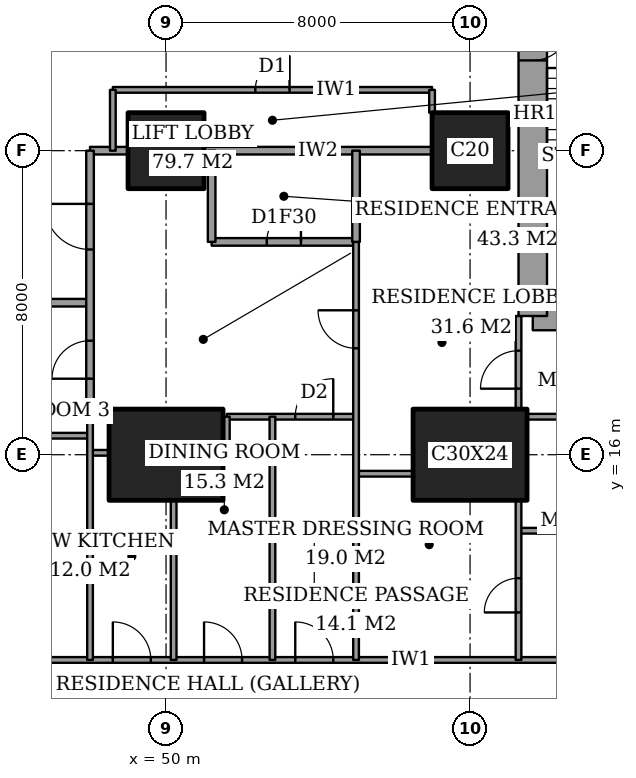
"""IFC4 building model, lengths in metres.
Left out: names, types, materials, properties, quantities, classifications, styles, units other than length and angle.
Written with IfcOpenShell. Run it as: python <this file> out.ifc"""

import sys

from ifc_helpers import new_model, si_unit, direction, frame, frame_2d, origin, origin_2d, place, context, subcontext, project, spatial, rectangle, extrude, element, fill, save


model = new_model("IFC4")
c1 = context("Model", 3, precision=1e-05, world=origin(), true_north=direction((0.0, 1.0)))
c2 = subcontext(c1, "Body", "Model", "MODEL_VIEW")
j1 = project(units=[si_unit("LENGTHUNIT", "METRE"), si_unit("PLANEANGLEUNIT", "RADIAN")], contexts=[c1])
p1 = place(None, origin())
s1 = spatial("IfcSite", under=j1, at=p1, CompositionType="ELEMENT")
p2 = place(p1, origin())
s2 = spatial("IfcBuilding", under=s1, at=p2, CompositionType="ELEMENT")
p3 = place(p2, frame((0.0, 0.0, 65.6)))
s3 = spatial("IfcBuildingStorey", under=s2, at=p3, CompositionType="ELEMENT", Elevation=65.6)
p4 = place(p3, frame((50.0, 16.0, 0.0), z_axis=(0.0, 0.0, 1.0), x_axis=(1.0, 0.0, 0.0)))
e1 = element("IfcColumn", 1, at=p4, inside=s3, PredefinedType="COLUMN", context=c2, shape_type="SweptSolid", body=[
    extrude(rectangle(XDim=3.0, YDim=2.4, at=origin_2d()), origin(), (0.0, 0.0, 1.0), 3.6),
])
p5 = place(p3, frame((50.0, 24.0, 0.0), z_axis=(0.0, 0.0, 1.0), x_axis=(1.0, 0.0, 0.0)))
e2 = element("IfcColumn", 2, at=p5, inside=s3, PredefinedType="COLUMN", context=c2, shape_type="SweptSolid", body=[
    extrude(rectangle(XDim=2.0, YDim=2.0, at=origin_2d()), origin(), (0.0, 0.0, 1.0), 3.6),
])
p6 = place(p3, frame((58.0, 16.0, 0.0), z_axis=(0.0, 0.0, 1.0), x_axis=(1.0, 0.0, 0.0)))
e3 = element("IfcColumn", 3, at=p6, inside=s3, PredefinedType="COLUMN", context=c2, shape_type="SweptSolid", body=[
    extrude(rectangle(XDim=3.0, YDim=2.4, at=origin_2d()), origin(), (0.0, 0.0, 1.0), 3.6),
])
p7 = place(p3, frame((58.0, 24.0, 0.0), z_axis=(0.0, 0.0, 1.0), x_axis=(1.0, 0.0, 0.0)))
e4 = element("IfcColumn", 4, at=p7, inside=s3, PredefinedType="COLUMN", context=c2, shape_type="SweptSolid", body=[
    extrude(rectangle(XDim=2.0, YDim=2.0, at=origin_2d()), origin(), (0.0, 0.0, 1.0), 3.6),
])
p8 = place(p3, frame((59.65, 19.65, 0.0), z_axis=(0.0, 0.0, 1.0), x_axis=(1.0, 0.0, 0.0)))
e5 = element("IfcWall", 5, at=p8, inside=s3, PredefinedType="SHEAR", context=c2, shape_type="SweptSolid", body=[
    extrude(rectangle(XDim=4.45, YDim=0.75, at=frame_2d((2.225, 0.0))), origin(), (0.0, 0.0, 1.0), 3.6),
])
p9 = place(p3, frame((59.65, 28.35, 0.0), z_axis=(0.0, 0.0, 1.0), x_axis=(0.0, -1.0, 0.0)))
e6 = element("IfcWall", 6, at=p9, inside=s3, PredefinedType="SHEAR", context=c2, shape_type="SweptSolid", body=[
    extrude(rectangle(XDim=8.7, YDim=0.75, at=frame_2d((4.35, 0.0))), origin(), (0.0, 0.0, 1.0), 3.6),
])
p10 = place(p9, frame((0.975, 0.0, 0.0)))
e7 = element("IfcOpeningElement", 7, at=p10, cuts=e6, PredefinedType="OPENING", context=c2, shape_type="SweptSolid", body=[
    extrude(rectangle(XDim=1.0, YDim=2.1, at=frame_2d((0.5, 1.05))), frame((0.0, 0.385, 0.0), z_axis=(0.0, -1.0, 0.0), x_axis=(1.0, 0.0, 0.0)), (0.0, 0.0, 1.0), 0.77),
])
p11 = place(p3, frame((41.439, 10.6, 0.0), z_axis=(0.0, 0.0, 1.0), x_axis=(1.0, 0.0, 0.0)))
e8 = element("IfcWall", 8, at=p11, inside=s3, PredefinedType="PARTITIONING", context=c2, shape_type="SweptSolid", body=[
    extrude(rectangle(XDim=25.011, YDim=0.15, at=frame_2d((12.505, 0.0))), origin(), (0.0, 0.0, 1.0), 3.35),
])
p12 = place(p11, frame((11.961, 0.0, 0.0)))
e9 = element("IfcOpeningElement", 9, at=p12, cuts=e8, PredefinedType="OPENING", context=c2, shape_type="SweptSolid", body=[
    extrude(rectangle(XDim=1.0, YDim=2.1, at=frame_2d((0.5, 1.05))), frame((0.0, 0.085, 0.0), z_axis=(0.0, -1.0, 0.0), x_axis=(1.0, 0.0, 0.0)), (0.0, 0.0, 1.0), 0.17),
])
p13 = place(p11, frame((20.924, 0.0, 0.0)))
e10 = element("IfcOpeningElement", 10, at=p13, cuts=e8, PredefinedType="OPENING", context=c2, shape_type="SweptSolid", body=[
    extrude(rectangle(XDim=1.0, YDim=2.1, at=frame_2d((0.5, 1.05))), frame((0.0, 0.085, 0.0), z_axis=(0.0, -1.0, 0.0), x_axis=(1.0, 0.0, 0.0)), (0.0, 0.0, 1.0), 0.17),
])
p14 = place(p11, frame((9.561, 0.0, 0.0)))
e11 = element("IfcOpeningElement", 11, at=p14, cuts=e8, PredefinedType="OPENING", context=c2, shape_type="SweptSolid", body=[
    extrude(rectangle(XDim=1.0, YDim=2.1, at=frame_2d((0.5, 1.05))), frame((0.0, 0.085, 0.0), z_axis=(0.0, -1.0, 0.0), x_axis=(1.0, 0.0, 0.0)), (0.0, 0.0, 1.0), 0.17),
])
p15 = place(p11, frame((7.161, 0.0, 0.0)))
e12 = element("IfcOpeningElement", 12, at=p15, cuts=e8, PredefinedType="OPENING", context=c2, shape_type="SweptSolid", body=[
    extrude(rectangle(XDim=1.0, YDim=2.1, at=frame_2d((0.5, 1.05))), frame((0.0, 0.085, 0.0), z_axis=(0.0, -1.0, 0.0), x_axis=(1.0, 0.0, 0.0)), (0.0, 0.0, 1.0), 0.17),
])
p16 = place(p11, frame((2.836, 0.0, 0.0)))
e13 = element("IfcOpeningElement", 13, at=p16, cuts=e8, PredefinedType="OPENING", context=c2, shape_type="SweptSolid", body=[
    extrude(rectangle(XDim=1.0, YDim=2.1, at=frame_2d((0.5, 1.05))), frame((0.0, 0.085, 0.0), z_axis=(0.0, -1.0, 0.0), x_axis=(1.0, 0.0, 0.0)), (0.0, 0.0, 1.0), 0.17),
])
p17 = place(p3, frame((45.6, 13.9, 0.0), z_axis=(0.0, 0.0, 1.0), x_axis=(1.0, 0.0, 0.0)))
e14 = element("IfcWall", 14, at=p17, inside=s3, PredefinedType="PARTITIONING", context=c2, shape_type="SweptSolid", body=[
    extrude(rectangle(XDim=2.4, YDim=0.15, at=frame_2d((1.2, 0.0))), origin(), (0.0, 0.0, 1.0), 3.35),
])
p18 = place(p3, frame((59.275, 14.0, 0.0), z_axis=(0.0, 0.0, 1.0), x_axis=(1.0, 0.0, 0.0)))
e15 = element("IfcWall", 15, at=p18, inside=s3, PredefinedType="PARTITIONING", context=c2, shape_type="SweptSolid", body=[
    extrude(rectangle(XDim=2.6, YDim=0.15, at=frame_2d((1.3, 0.0))), origin(), (0.0, 0.0, 1.0), 3.35),
])
p19 = place(p3, frame((55.0, 15.5, 0.0), z_axis=(0.0, 0.0, 1.0), x_axis=(1.0, 0.0, 0.0)))
e16 = element("IfcWall", 16, at=p19, inside=s3, PredefinedType="PARTITIONING", context=c2, shape_type="SweptSolid", body=[
    extrude(rectangle(XDim=1.5, YDim=0.15, at=frame_2d((0.75, 0.0))), origin(), (0.0, 0.0, 1.0), 3.35),
])
p20 = place(p3, frame((48.0, 16.05, 0.0), z_axis=(0.0, 0.0, 1.0), x_axis=(1.0, 0.0, 0.0)))
e17 = element("IfcWall", 17, at=p20, inside=s3, PredefinedType="PARTITIONING", context=c2, shape_type="SweptSolid", body=[
    extrude(rectangle(XDim=0.5, YDim=0.15, at=frame_2d((0.25, 0.0))), origin(), (0.0, 0.0, 1.0), 2.634),
])
p21 = place(p3, frame((42.0, 16.5, 0.0), z_axis=(0.0, 0.0, 1.0), x_axis=(1.0, 0.0, 0.0)))
e18 = element("IfcWall", 18, at=p21, inside=s3, PredefinedType="PARTITIONING", context=c2, shape_type="SweptSolid", body=[
    extrude(rectangle(XDim=6.0, YDim=0.15, at=frame_2d((3.0, 0.0))), origin(), (0.0, 0.0, 1.0), 3.35),
])
p22 = place(p3, frame((51.6, 17.0, 0.0), z_axis=(0.0, 0.0, 1.0), x_axis=(1.0, 0.0, 0.0)))
e19 = element("IfcWall", 19, at=p22, inside=s3, PredefinedType="PARTITIONING", context=c2, shape_type="SweptSolid", body=[
    extrude(rectangle(XDim=3.4, YDim=0.15, at=frame_2d((1.7, 0.0))), origin(), (0.0, 0.0, 1.0), 3.35),
])
p23 = place(p22, frame((1.8, 0.0, 0.0)))
e20 = element("IfcOpeningElement", 20, at=p23, cuts=e19, PredefinedType="OPENING", context=c2, shape_type="SweptSolid", body=[
    extrude(rectangle(XDim=1.0, YDim=2.1, at=frame_2d((0.5, 1.05))), frame((0.0, 0.085, 0.0), z_axis=(0.0, -1.0, 0.0), x_axis=(1.0, 0.0, 0.0)), (0.0, 0.0, 1.0), 0.17),
])
p24 = place(p3, frame((59.5, 17.0, 0.0), z_axis=(0.0, 0.0, 1.0), x_axis=(1.0, 0.0, 0.0)))
e21 = element("IfcWall", 21, at=p24, inside=s3, PredefinedType="PARTITIONING", context=c2, shape_type="SweptSolid", body=[
    extrude(rectangle(XDim=5.15, YDim=0.15, at=frame_2d((2.575, 0.0))), origin(), (0.0, 0.0, 1.0), 3.35),
])
p25 = place(p3, frame((42.0, 20.0, 0.0), z_axis=(0.0, 0.0, 1.0), x_axis=(1.0, 0.0, 0.0)))
e22 = element("IfcWall", 22, at=p25, inside=s3, PredefinedType="PARTITIONING", context=c2, shape_type="SweptSolid", body=[
    extrude(rectangle(XDim=6.0, YDim=0.2, at=frame_2d((3.0, 0.0))), origin(), (0.0, 0.0, 1.0), 3.35),
])
p26 = place(p3, frame((51.2, 21.6, 0.0), z_axis=(0.0, 0.0, 1.0), x_axis=(1.0, 0.0, 0.0)))
e23 = element("IfcWall", 23, at=p26, inside=s3, PredefinedType="PARTITIONING", context=c2, shape_type="SweptSolid", body=[
    extrude(rectangle(XDim=3.8, YDim=0.2, at=frame_2d((1.9, 0.0))), origin(), (0.0, 0.0, 1.0), 3.35),
])
p27 = place(p26, frame((1.45, 0.0, 0.0)))
e24 = element("IfcOpeningElement", 24, at=p27, cuts=e23, PredefinedType="OPENING", context=c2, shape_type="SweptSolid", body=[
    extrude(rectangle(XDim=0.9, YDim=2.1, at=frame_2d((0.45, 1.05))), frame((0.0, 0.11, 0.0), z_axis=(0.0, -1.0, 0.0), x_axis=(1.0, 0.0, 0.0)), (0.0, 0.0, 1.0), 0.22),
])
p28 = place(p3, frame((48.0, 24.0, 0.0), z_axis=(0.0, 0.0, 1.0), x_axis=(1.0, 0.0, 0.0)))
e25 = element("IfcWall", 25, at=p28, inside=s3, PredefinedType="PARTITIONING", context=c2, shape_type="SweptSolid", body=[
    extrude(rectangle(XDim=1.0, YDim=0.2, at=frame_2d((0.5, 0.0))), origin(), (0.0, 0.0, 1.0), 3.35),
])
p29 = place(p3, frame((51.0, 24.0, 0.0), z_axis=(0.0, 0.0, 1.0), x_axis=(1.0, 0.0, 0.0)))
e26 = element("IfcWall", 26, at=p29, inside=s3, PredefinedType="PARTITIONING", context=c2, shape_type="SweptSolid", body=[
    extrude(rectangle(XDim=6.0, YDim=0.2, at=frame_2d((3.0, 0.0))), origin(), (0.0, 0.0, 1.0), 3.35),
])
p30 = place(p3, frame((48.6, 25.6, 0.0), z_axis=(0.0, 0.0, 1.0), x_axis=(1.0, 0.0, 0.0)))
e27 = element("IfcWall", 27, at=p30, inside=s3, PredefinedType="PARTITIONING", context=c2, shape_type="SweptSolid", body=[
    extrude(rectangle(XDim=8.4, YDim=0.15, at=frame_2d((4.2, 0.0))), origin(), (0.0, 0.0, 1.0), 3.35),
])
p31 = place(p30, frame((3.75, 0.0, 0.0)))
e28 = element("IfcOpeningElement", 28, at=p31, cuts=e27, PredefinedType="OPENING", context=c2, shape_type="SweptSolid", body=[
    extrude(rectangle(XDim=0.9, YDim=2.1, at=frame_2d((0.45, 1.05))), frame((0.0, 0.085, 0.0), z_axis=(0.0, -1.0, 0.0), x_axis=(1.0, 0.0, 0.0)), (0.0, 0.0, 1.0), 0.17),
])
p32 = place(p3, frame((48.0, 17.0, 0.0), z_axis=(0.0, 0.0, 1.0), x_axis=(0.0, 1.0, 0.0)))
e29 = element("IfcWall", 29, at=p32, inside=s3, PredefinedType="PARTITIONING", context=c2, shape_type="SweptSolid", body=[
    extrude(rectangle(XDim=7.0, YDim=0.2, at=frame_2d((3.5, 0.0))), origin(), (0.0, 0.0, 1.0), 3.35),
])
p33 = place(p32, frame((4.4, 0.0, 0.0)))
e30 = element("IfcOpeningElement", 30, at=p33, cuts=e29, PredefinedType="OPENING", context=c2, shape_type="SweptSolid", body=[
    extrude(rectangle(XDim=1.2, YDim=2.4, at=frame_2d((0.6, 1.2))), frame((0.0, 0.11, 0.0), z_axis=(0.0, -1.0, 0.0), x_axis=(1.0, 0.0, 0.0)), (0.0, 0.0, 1.0), 0.22),
])
p34 = place(p32, frame((1.0, 0.0, 0.0)))
e31 = element("IfcOpeningElement", 31, at=p34, cuts=e29, PredefinedType="OPENING", context=c2, shape_type="SweptSolid", body=[
    extrude(rectangle(XDim=1.0, YDim=2.1, at=frame_2d((0.5, 1.05))), frame((0.0, 0.11, 0.0), z_axis=(0.0, -1.0, 0.0), x_axis=(1.0, 0.0, 0.0)), (0.0, 0.0, 1.0), 0.22),
])
p35 = place(p3, frame((48.0, 10.6, 0.0), z_axis=(0.0, 0.0, 1.0), x_axis=(0.0, 1.0, 0.0)))
e32 = element("IfcWall", 32, at=p35, inside=s3, PredefinedType="PARTITIONING", context=c2, shape_type="SweptSolid", body=[
    extrude(rectangle(XDim=6.4, YDim=0.15, at=frame_2d((3.2, 0.0))), origin(), (0.0, 0.0, 1.0), 3.35),
])
p36 = place(p3, frame((48.6, 24.0, 0.0), z_axis=(0.0, 0.0, 1.0), x_axis=(0.0, 1.0, 0.0)))
e33 = element("IfcWall", 33, at=p36, inside=s3, PredefinedType="PARTITIONING", context=c2, shape_type="SweptSolid", body=[
    extrude(rectangle(XDim=1.6, YDim=0.15, at=frame_2d((0.8, 0.0))), origin(), (0.0, 0.0, 1.0), 3.35),
])
p37 = place(p3, frame((50.2, 10.6, 0.0), z_axis=(0.0, 0.0, 1.0), x_axis=(0.0, 1.0, 0.0)))
e34 = element("IfcWall", 34, at=p37, inside=s3, PredefinedType="PARTITIONING", context=c2, shape_type="SweptSolid", body=[
    extrude(rectangle(XDim=4.2, YDim=0.15, at=frame_2d((2.1, 0.0))), origin(), (0.0, 0.0, 1.0), 3.35),
])
p38 = place(p3, frame((51.2, 21.6, 0.0), z_axis=(0.0, 0.0, 1.0), x_axis=(0.0, 1.0, 0.0)))
e35 = element("IfcWall", 35, at=p38, inside=s3, PredefinedType="PARTITIONING", context=c2, shape_type="SweptSolid", body=[
    extrude(rectangle(XDim=2.4, YDim=0.2, at=frame_2d((1.2, 0.0))), origin(), (0.0, 0.0, 1.0), 3.35),
])
p39 = place(p3, frame((51.6, 16.05, 0.0), z_axis=(0.0, 0.0, 1.0), x_axis=(0.0, 1.0, 0.0)))
e36 = element("IfcWall", 36, at=p39, inside=s3, PredefinedType="PARTITIONING", context=c2, shape_type="SweptSolid", body=[
    extrude(rectangle(XDim=0.95, YDim=0.15, at=frame_2d((0.475, 0.0))), origin(), (0.0, 0.0, 1.0), 3.35),
])
p40 = place(p3, frame((52.8, 10.6, 0.0), z_axis=(0.0, 0.0, 1.0), x_axis=(0.0, 1.0, 0.0)))
e37 = element("IfcWall", 37, at=p40, inside=s3, PredefinedType="PARTITIONING", context=c2, shape_type="SweptSolid", body=[
    extrude(rectangle(XDim=6.4, YDim=0.15, at=frame_2d((3.2, 0.0))), origin(), (0.0, 0.0, 1.0), 3.35),
])
p41 = place(p3, frame((55.0, 21.6, 0.0), z_axis=(0.0, 0.0, 1.0), x_axis=(0.0, 1.0, 0.0)))
e38 = element("IfcWall", 38, at=p41, inside=s3, PredefinedType="PARTITIONING", context=c2, shape_type="SweptSolid", body=[
    extrude(rectangle(XDim=2.4, YDim=0.2, at=frame_2d((1.2, 0.0))), origin(), (0.0, 0.0, 1.0), 3.35),
])
p42 = place(p3, frame((55.0, 10.6, 0.0), z_axis=(0.0, 0.0, 1.0), x_axis=(0.0, 1.0, 0.0)))
e39 = element("IfcWall", 39, at=p42, inside=s3, PredefinedType="PARTITIONING", context=c2, shape_type="SweptSolid", body=[
    extrude(rectangle(XDim=11.0, YDim=0.15, at=frame_2d((5.5, 0.0))), origin(), (0.0, 0.0, 1.0), 3.35),
])
p43 = place(p42, frame((8.2, 0.0, 0.0)))
e40 = element("IfcOpeningElement", 40, at=p43, cuts=e39, PredefinedType="OPENING", context=c2, shape_type="SweptSolid", body=[
    extrude(rectangle(XDim=1.0, YDim=2.1, at=frame_2d((0.5, 1.05))), frame((0.0, 0.085, 0.0), z_axis=(0.0, -1.0, 0.0), x_axis=(1.0, 0.0, 0.0)), (0.0, 0.0, 1.0), 0.17),
])
p44 = place(p3, frame((57.0, 25.0, 0.0), z_axis=(0.0, 0.0, 1.0), x_axis=(0.0, 1.0, 0.0)))
e41 = element("IfcWall", 41, at=p44, inside=s3, PredefinedType="PARTITIONING", context=c2, shape_type="SweptSolid", body=[
    extrude(rectangle(XDim=0.6, YDim=0.15, at=frame_2d((0.3, 0.0))), origin(), (0.0, 0.0, 1.0), 3.35),
])
p45 = place(p3, frame((59.275, 10.6, 0.0), z_axis=(0.0, 0.0, 1.0), x_axis=(0.0, 1.0, 0.0)))
e42 = element("IfcWall", 42, at=p45, inside=s3, PredefinedType="PARTITIONING", context=c2, shape_type="SweptSolid", body=[
    extrude(rectangle(XDim=4.2, YDim=0.15, at=frame_2d((2.1, 0.0))), origin(), (0.0, 0.0, 1.0), 3.35),
])
p46 = place(p45, frame((1.25, 0.0, 0.0)))
e43 = element("IfcOpeningElement", 43, at=p46, cuts=e42, PredefinedType="OPENING", context=c2, shape_type="SweptSolid", body=[
    extrude(rectangle(XDim=0.9, YDim=2.1, at=frame_2d((0.45, 1.05))), frame((0.0, 0.085, 0.0), z_axis=(0.0, -1.0, 0.0), x_axis=(1.0, 0.0, 0.0)), (0.0, 0.0, 1.0), 0.17),
])
p47 = place(p3, frame((59.275, 17.2, 0.0), z_axis=(0.0, 0.0, 1.0), x_axis=(0.0, 1.0, 0.0)))
e44 = element("IfcWall", 44, at=p47, inside=s3, PredefinedType="PARTITIONING", context=c2, shape_type="SweptSolid", body=[
    extrude(rectangle(XDim=2.45, YDim=0.15, at=frame_2d((1.225, 0.0))), origin(), (0.0, 0.0, 1.0), 3.35),
])
p48 = place(p47, frame((0.538, 0.0, 0.0)))
e45 = element("IfcOpeningElement", 45, at=p48, cuts=e44, PredefinedType="OPENING", context=c2, shape_type="SweptSolid", body=[
    extrude(rectangle(XDim=1.0, YDim=2.1, at=frame_2d((0.5, 1.05))), frame((0.0, 0.085, 0.0), z_axis=(0.0, -1.0, 0.0), x_axis=(1.0, 0.0, 0.0)), (0.0, 0.0, 1.0), 0.17),
])
p49 = place(p12, origin())
e46 = element("IfcDoor", 46, at=p49, inside=s3, OperationType="SINGLE_SWING_RIGHT", PredefinedType="DOOR", context=c2, shape_type="SweptSolid", body=[
    extrude(rectangle(XDim=1.0, YDim=2.1, at=frame_2d((0.5, 1.05))), frame((0.0, 0.025, 0.0), z_axis=(0.0, -1.0, 0.0), x_axis=(1.0, 0.0, 0.0)), (0.0, 0.0, 1.0), 0.05),
])
fill(e9, e46)
p50 = place(p48, origin())
e47 = element("IfcDoor", 47, at=p50, inside=s3, OperationType="SINGLE_SWING_RIGHT", PredefinedType="DOOR", context=c2, shape_type="SweptSolid", body=[
    extrude(rectangle(XDim=1.0, YDim=2.1, at=frame_2d((0.5, 1.05))), frame((0.0, 0.025, 0.0), z_axis=(0.0, -1.0, 0.0), x_axis=(1.0, 0.0, 0.0)), (0.0, 0.0, 1.0), 0.05),
])
fill(e45, e47)
p51 = place(p46, origin())
e48 = element("IfcDoor", 48, at=p51, inside=s3, OperationType="SINGLE_SWING_RIGHT", PredefinedType="DOOR", context=c2, shape_type="SweptSolid", body=[
    extrude(rectangle(XDim=0.9, YDim=2.1, at=frame_2d((0.45, 1.05))), frame((0.0, 0.025, 0.0), z_axis=(0.0, -1.0, 0.0), x_axis=(1.0, 0.0, 0.0)), (0.0, 0.0, 1.0), 0.05),
])
fill(e43, e48)
p52 = place(p43, origin())
e49 = element("IfcDoor", 49, at=p52, inside=s3, OperationType="SINGLE_SWING_LEFT", PredefinedType="DOOR", context=c2, shape_type="SweptSolid", body=[
    extrude(rectangle(XDim=1.0, YDim=2.1, at=frame_2d((0.5, 1.05))), frame((0.0, 0.025, 0.0), z_axis=(0.0, -1.0, 0.0), x_axis=(1.0, 0.0, 0.0)), (0.0, 0.0, 1.0), 0.05),
])
fill(e40, e49)
p53 = place(p27, origin())
e50 = element("IfcDoor", 50, at=p53, inside=s3, OperationType="SINGLE_SWING_LEFT", PredefinedType="DOOR", context=c2, shape_type="SweptSolid", body=[
    extrude(rectangle(XDim=0.9, YDim=2.1, at=frame_2d((0.45, 1.05))), frame((0.0, 0.025, 0.0), z_axis=(0.0, -1.0, 0.0), x_axis=(1.0, 0.0, 0.0)), (0.0, 0.0, 1.0), 0.05),
])
fill(e24, e50)
p54 = place(p33, origin())
e51 = element("IfcDoor", 51, at=p54, inside=s3, OperationType="SINGLE_SWING_LEFT", PredefinedType="DOOR", context=c2, shape_type="SweptSolid", body=[
    extrude(rectangle(XDim=1.2, YDim=2.4, at=frame_2d((0.6, 1.2))), frame((0.0, 0.025, 0.0), z_axis=(0.0, -1.0, 0.0), x_axis=(1.0, 0.0, 0.0)), (0.0, 0.0, 1.0), 0.05),
])
fill(e30, e51)
p55 = place(p23, origin())
e52 = element("IfcDoor", 52, at=p55, inside=s3, OperationType="SINGLE_SWING_LEFT", PredefinedType="DOOR", context=c2, shape_type="SweptSolid", body=[
    extrude(rectangle(XDim=1.0, YDim=2.1, at=frame_2d((0.5, 1.05))), frame((0.0, 0.025, 0.0), z_axis=(0.0, -1.0, 0.0), x_axis=(1.0, 0.0, 0.0)), (0.0, 0.0, 1.0), 0.05),
])
fill(e20, e52)
p56 = place(p14, origin())
e53 = element("IfcDoor", 53, at=p56, inside=s3, OperationType="SINGLE_SWING_RIGHT", PredefinedType="DOOR", context=c2, shape_type="SweptSolid", body=[
    extrude(rectangle(XDim=1.0, YDim=2.1, at=frame_2d((0.5, 1.05))), frame((0.0, 0.025, 0.0), z_axis=(0.0, -1.0, 0.0), x_axis=(1.0, 0.0, 0.0)), (0.0, 0.0, 1.0), 0.05),
])
fill(e11, e53)
p57 = place(p15, origin())
e54 = element("IfcDoor", 54, at=p57, inside=s3, OperationType="SINGLE_SWING_RIGHT", PredefinedType="DOOR", context=c2, shape_type="SweptSolid", body=[
    extrude(rectangle(XDim=1.0, YDim=2.1, at=frame_2d((0.5, 1.05))), frame((0.0, 0.025, 0.0), z_axis=(0.0, -1.0, 0.0), x_axis=(1.0, 0.0, 0.0)), (0.0, 0.0, 1.0), 0.05),
])
fill(e12, e54)
p58 = place(p34, origin())
e55 = element("IfcDoor", 55, at=p58, inside=s3, OperationType="SINGLE_SWING_RIGHT", PredefinedType="DOOR", context=c2, shape_type="SweptSolid", body=[
    extrude(rectangle(XDim=1.0, YDim=2.1, at=frame_2d((0.5, 1.05))), frame((0.0, 0.025, 0.0), z_axis=(0.0, -1.0, 0.0), x_axis=(1.0, 0.0, 0.0)), (0.0, 0.0, 1.0), 0.05),
])
fill(e31, e55)
p59 = place(p31, origin())
e56 = element("IfcDoor", 56, at=p59, inside=s3, OperationType="SINGLE_SWING_LEFT", PredefinedType="DOOR", context=c2, shape_type="SweptSolid", body=[
    extrude(rectangle(XDim=0.9, YDim=2.1, at=frame_2d((0.45, 1.05))), frame((0.0, 0.025, 0.0), z_axis=(0.0, -1.0, 0.0), x_axis=(1.0, 0.0, 0.0)), (0.0, 0.0, 1.0), 0.05),
])
fill(e28, e56)
p60 = place(p10, origin())
e57 = element("IfcDoor", 57, at=p60, inside=s3, OperationType="SINGLE_SWING_RIGHT", PredefinedType="DOOR", context=c2, shape_type="SweptSolid", body=[
    extrude(rectangle(XDim=1.0, YDim=2.1, at=frame_2d((0.5, 1.05))), frame((0.0, 0.025, 0.0), z_axis=(0.0, -1.0, 0.0), x_axis=(1.0, 0.0, 0.0)), (0.0, 0.0, 1.0), 0.05),
])
fill(e7, e57)
save(model, sys.argv[1])
